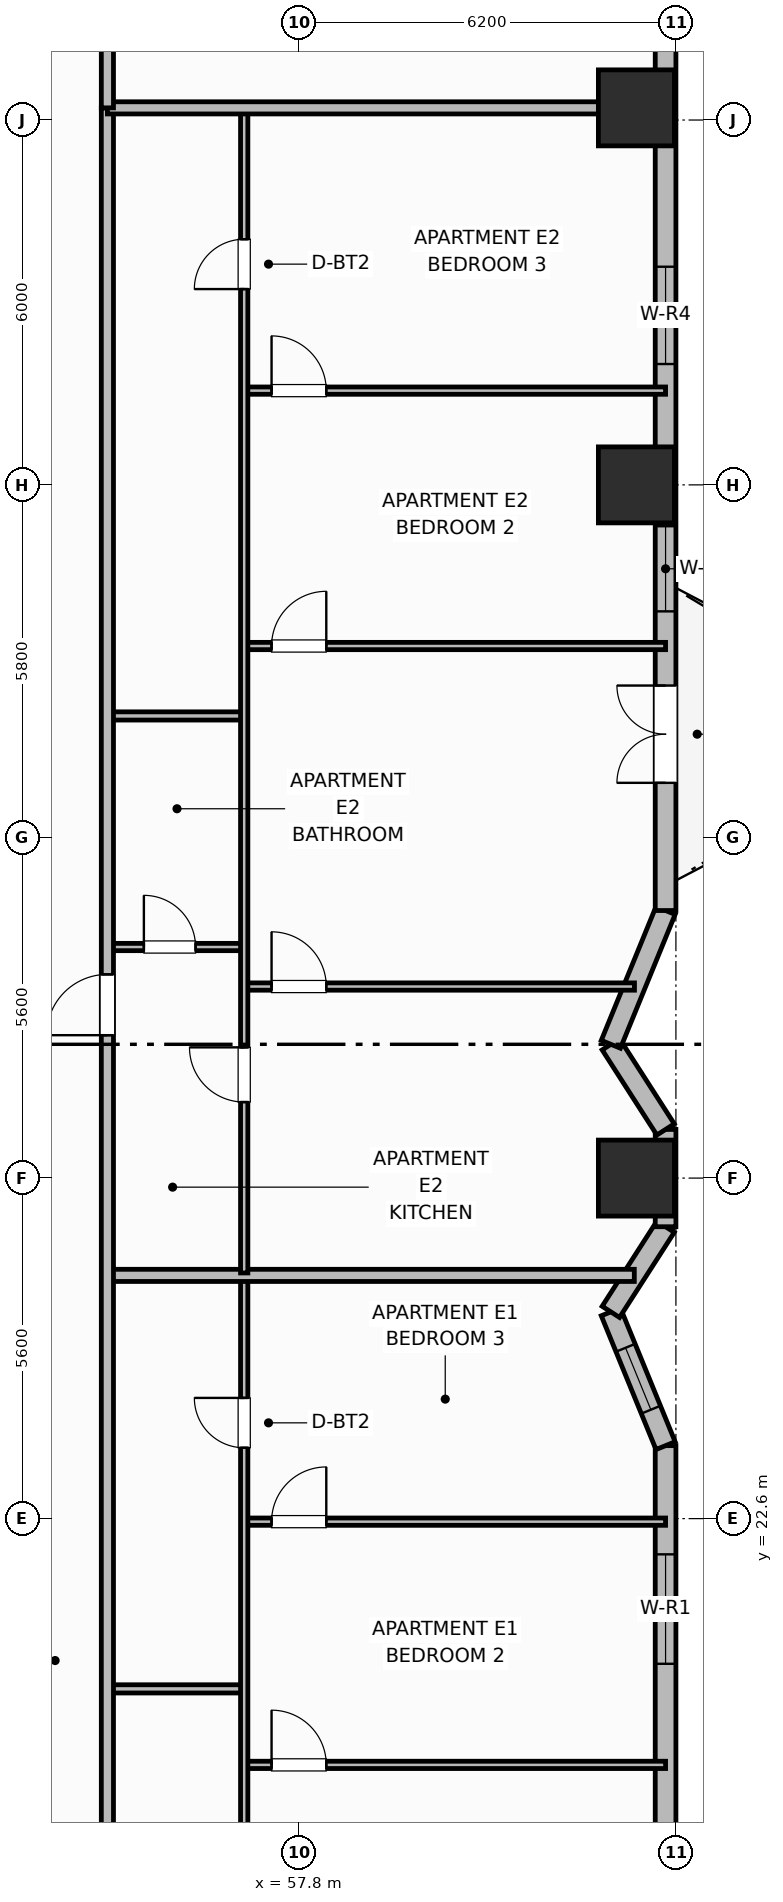
"""IFC4 building model, lengths in metres.
Left out: names, types, materials, properties, quantities, classifications, styles, units other than length and angle.
Written with IfcOpenShell. Run it as: python <this file> out.ifc"""

import sys

from ifc_helpers import new_model, si_unit, direction, frame, frame_2d, origin, origin_2d, place, context, subcontext, project, spatial, rectangle, extrude, element, fill, save


model = new_model("IFC4")
c1 = context("Model", 3, precision=1e-05, world=origin(), true_north=direction((0.0, 1.0)))
c2 = subcontext(c1, "Body", "Model", "MODEL_VIEW")
j1 = project(units=[si_unit("LENGTHUNIT", "METRE"), si_unit("PLANEANGLEUNIT", "RADIAN")], contexts=[c1])
p1 = place(None, origin())
s1 = spatial("IfcSite", under=j1, at=p1, CompositionType="ELEMENT")
p2 = place(p1, origin())
s2 = spatial("IfcBuilding", under=s1, at=p2, CompositionType="ELEMENT")
p3 = place(p2, frame((0.0, 0.0, 39.9)))
s3 = spatial("IfcBuildingStorey", under=s2, at=p3, CompositionType="ELEMENT", Elevation=39.9)
for number, where, z_axis, x_axis in (
    (1, (63.35, 28.2, 0.0), (0.0, 0.0, 1.0), (1.0, 0.0, 0.0)),
    (2, (63.35, 39.6, 0.0), (0.0, 0.0, 1.0), (1.0, 0.0, 0.0)),
    (3, (63.35, 45.8, 0.0), (0.0, 0.0, 1.0), (1.0, 0.0, 0.0)),
):
    element("IfcColumn", number, at=place(p3, frame(where, z_axis=z_axis, x_axis=x_axis)), inside=s3, PredefinedType="COLUMN", context=c2, shape_type="SweptSolid", body=[
        extrude(rectangle(XDim=1.25, YDim=1.25, at=origin_2d()), origin(), (0.0, 0.0, 1.0), 3.7),
    ])
p4 = place(p3, frame((63.83, 9.0, 0.0), z_axis=(0.0, 0.0, 1.0), x_axis=(0.0, 1.0, 0.0)))
e4 = element("IfcWall", 4, at=p4, inside=s3, PredefinedType="SOLIDWALL", context=c2, shape_type="SweptSolid", body=[
    extrude(rectangle(XDim=14.8, YDim=0.34, at=frame_2d((7.4, 0.0))), origin(), (0.0, 0.0, 1.0), 2.7),
])
p5 = place(p4, frame((6.0, 0.0, 0.89)))
e5 = element("IfcOpeningElement", 5, at=p5, cuts=e4, PredefinedType="OPENING", context=c2, shape_type="SweptSolid", body=[
    extrude(rectangle(XDim=1.1, YDim=1.65, at=frame_2d((0.55, 0.825))), frame((0.0, 0.18, 0.0), z_axis=(0.0, -1.0, 0.0), x_axis=(1.0, 0.0, 0.0)), (0.0, 0.0, 1.0), 0.36),
])
p6 = place(p4, frame((11.212, 0.0, 0.73)))
e6 = element("IfcOpeningElement", 6, at=p6, cuts=e4, PredefinedType="OPENING", context=c2, shape_type="SweptSolid", body=[
    extrude(rectangle(XDim=1.8, YDim=1.85, at=frame_2d((0.9, 0.925))), frame((0.0, 0.18, 0.0), z_axis=(0.0, -1.0, 0.0), x_axis=(1.0, 0.0, 0.0)), (0.0, 0.0, 1.0), 0.36),
])
p7 = place(p3, frame((63.83, 23.8, 0.0), z_axis=(0.0, 0.0, 1.0), x_axis=(-0.378692835005, 0.925522412865, 0.0)))
e7 = element("IfcWall", 7, at=p7, inside=s3, PredefinedType="SOLIDWALL", context=c2, shape_type="SweptSolid", body=[
    extrude(rectangle(XDim=2.377, YDim=0.34, at=frame_2d((1.188, 0.0))), origin(), (0.0, 0.0, 1.0), 2.7),
])
p8 = place(p7, frame((0.638, 0.0, 0.89)))
e8 = element("IfcOpeningElement", 8, at=p8, cuts=e7, PredefinedType="OPENING", context=c2, shape_type="SweptSolid", body=[
    extrude(rectangle(XDim=1.1, YDim=1.65, at=frame_2d((0.55, 0.825))), frame((0.0, 0.18, 0.0), z_axis=(0.0, -1.0, 0.0), x_axis=(1.0, 0.0, 0.0)), (0.0, 0.0, 1.0), 0.36),
])
p9 = place(p3, frame((62.93, 26.0, 0.0), z_axis=(0.0, 0.0, 1.0), x_axis=(0.540846555596, 0.841121277403, 0.0)))
e9 = element("IfcWall", 9, at=p9, inside=s3, PredefinedType="SOLIDWALL", context=c2, shape_type="SweptSolid", body=[
    extrude(rectangle(XDim=1.664, YDim=0.34, at=frame_2d((0.832, 0.0))), origin(), (0.0, 0.0, 1.0), 2.7),
])
p10 = place(p3, frame((63.83, 27.4, 0.0), z_axis=(0.0, 0.0, 1.0), x_axis=(0.0, 1.0, 0.0)))
e10 = element("IfcWall", 10, at=p10, inside=s3, PredefinedType="SOLIDWALL", context=c2, shape_type="SweptSolid", body=[
    extrude(rectangle(XDim=1.6, YDim=0.34, at=frame_2d((0.8, 0.0))), origin(), (0.0, 0.0, 1.0), 2.7),
])
p11 = place(p3, frame((63.83, 29.0, 0.0), z_axis=(0.0, 0.0, 1.0), x_axis=(-0.540846555596, 0.841121277403, 0.0)))
e11 = element("IfcWall", 11, at=p11, inside=s3, PredefinedType="SOLIDWALL", context=c2, shape_type="SweptSolid", body=[
    extrude(rectangle(XDim=1.664, YDim=0.34, at=frame_2d((0.832, 0.0))), origin(), (0.0, 0.0, 1.0), 2.7),
])
p12 = place(p3, frame((62.93, 30.4, 0.0), z_axis=(0.0, 0.0, 1.0), x_axis=(0.378656839344, 0.925537140269, 0.0)))
e12 = element("IfcWall", 12, at=p12, inside=s3, PredefinedType="SOLIDWALL", context=c2, shape_type="SweptSolid", body=[
    extrude(rectangle(XDim=2.377, YDim=0.34, at=frame_2d((1.188, 0.0))), origin(), (0.0, 0.0, 1.0), 2.7),
])
p13 = place(p3, frame((63.83, 32.6, 0.0), z_axis=(0.0, 0.0, 1.0), x_axis=(0.0, 1.0, 0.0)))
e13 = element("IfcWall", 13, at=p13, inside=s3, PredefinedType="SOLIDWALL", context=c2, shape_type="SweptSolid", body=[
    extrude(rectangle(XDim=14.8, YDim=0.34, at=frame_2d((7.4, 0.0))), origin(), (0.0, 0.0, 1.0), 2.7),
])
p14 = place(p13, frame((2.1, 0.0, 0.0)))
e14 = element("IfcOpeningElement", 14, at=p14, cuts=e13, PredefinedType="OPENING", context=c2, shape_type="SweptSolid", body=[
    extrude(rectangle(XDim=1.6, YDim=2.1, at=frame_2d((0.8, 1.05))), frame((0.0, 0.18, 0.0), z_axis=(0.0, -1.0, 0.0), x_axis=(1.0, 0.0, 0.0)), (0.0, 0.0, 1.0), 0.36),
])
p15 = place(p13, frame((4.92, 0.0, 0.69)))
e15 = element("IfcOpeningElement", 15, at=p15, cuts=e13, PredefinedType="OPENING", context=c2, shape_type="SweptSolid", body=[
    extrude(rectangle(XDim=1.4, YDim=1.85, at=frame_2d((0.7, 0.925))), frame((0.0, 0.18, 0.0), z_axis=(0.0, -1.0, 0.0), x_axis=(1.0, 0.0, 0.0)), (0.0, 0.0, 1.0), 0.36),
])
p16 = place(p13, frame((8.988, 0.0, 0.68)))
e16 = element("IfcOpeningElement", 16, at=p16, cuts=e13, PredefinedType="OPENING", context=c2, shape_type="SweptSolid", body=[
    extrude(rectangle(XDim=1.6, YDim=1.9, at=frame_2d((0.8, 0.95))), frame((0.0, 0.18, 0.0), z_axis=(0.0, -1.0, 0.0), x_axis=(1.0, 0.0, 0.0)), (0.0, 0.0, 1.0), 0.36),
])
p17 = place(p3, frame((54.65, 19.8, 0.0), z_axis=(0.0, 0.0, 1.0), x_axis=(1.0, 0.0, 0.0)))
e17 = element("IfcWall", 17, at=p17, inside=s3, PredefinedType="PARTITIONING", context=c2, shape_type="SweptSolid", body=[
    extrude(rectangle(XDim=2.25, YDim=0.135, at=frame_2d((1.125, 0.0))), origin(), (0.0, 0.0, 1.0), 2.53),
])
p18 = place(p3, frame((56.9, 18.55, 0.0), z_axis=(0.0, 0.0, 1.0), x_axis=(1.0, 0.0, 0.0)))
e18 = element("IfcWall", 18, at=p18, inside=s3, PredefinedType="PARTITIONING", context=c2, shape_type="SweptSolid", body=[
    extrude(rectangle(XDim=6.93, YDim=0.12, at=frame_2d((3.465, 0.0))), origin(), (0.0, 0.0, 1.0), 2.53),
])
p19 = place(p18, frame((0.45, 0.0, 0.0)))
e19 = element("IfcOpeningElement", 19, at=p19, cuts=e18, PredefinedType="OPENING", context=c2, shape_type="SweptSolid", body=[
    extrude(rectangle(XDim=0.9, YDim=2.1, at=frame_2d((0.45, 1.05))), frame((0.0, 0.07, 0.0), z_axis=(0.0, -1.0, 0.0), x_axis=(1.0, 0.0, 0.0)), (0.0, 0.0, 1.0), 0.14),
])
p20 = place(p3, frame((56.9, 22.55, 0.0), z_axis=(0.0, 0.0, 1.0), x_axis=(1.0, 0.0, 0.0)))
e20 = element("IfcWall", 20, at=p20, inside=s3, PredefinedType="PARTITIONING", context=c2, shape_type="SweptSolid", body=[
    extrude(rectangle(XDim=6.93, YDim=0.12, at=frame_2d((3.465, 0.0))), origin(), (0.0, 0.0, 1.0), 2.53),
])
p21 = place(p20, frame((0.45, 0.0, 0.0)))
e21 = element("IfcOpeningElement", 21, at=p21, cuts=e20, PredefinedType="OPENING", context=c2, shape_type="SweptSolid", body=[
    extrude(rectangle(XDim=0.9, YDim=2.1, at=frame_2d((0.45, 1.05))), frame((0.0, 0.07, 0.0), z_axis=(0.0, -1.0, 0.0), x_axis=(1.0, 0.0, 0.0)), (0.0, 0.0, 1.0), 0.14),
])
p22 = place(p3, frame((56.9, 10.64, 0.0), z_axis=(0.0, 0.0, 1.0), x_axis=(0.0, 1.0, 0.0)))
e22 = element("IfcWall", 22, at=p22, inside=s3, PredefinedType="PARTITIONING", context=c2, shape_type="SweptSolid", body=[
    extrude(rectangle(XDim=15.92, YDim=0.12, at=frame_2d((7.96, 0.0))), origin(), (0.0, 0.0, 1.0), 2.53),
])
p23 = place(p22, frame((0.41, 0.0, 0.0)))
e23 = element("IfcOpeningElement", 23, at=p23, cuts=e22, PredefinedType="OPENING", context=c2, shape_type="SweptSolid", body=[
    extrude(rectangle(XDim=0.9, YDim=2.1, at=frame_2d((0.45, 1.05))), frame((0.0, 0.07, 0.0), z_axis=(0.0, -1.0, 0.0), x_axis=(1.0, 0.0, 0.0)), (0.0, 0.0, 1.0), 0.14),
])
p24 = place(p22, frame((13.125, 0.0, 0.0)))
e24 = element("IfcOpeningElement", 24, at=p24, cuts=e22, PredefinedType="OPENING", context=c2, shape_type="SweptSolid", body=[
    extrude(rectangle(XDim=0.82, YDim=2.08, at=frame_2d((0.41, 1.04))), frame((0.0, 0.07, 0.0), z_axis=(0.0, -1.0, 0.0), x_axis=(1.0, 0.0, 0.0)), (0.0, 0.0, 1.0), 0.14),
])
p25 = place(p3, frame((54.65, 26.6, 0.0), z_axis=(0.0, 0.0, 1.0), x_axis=(1.0, 0.0, 0.0)))
e25 = element("IfcWall", 25, at=p25, inside=s3, PredefinedType="PARTITIONING", context=c2, shape_type="SweptSolid", body=[
    extrude(rectangle(XDim=8.666, YDim=0.2, at=frame_2d((4.333, 0.0))), origin(), (0.0, 0.0, 1.0), 2.53),
])
p26 = place(p3, frame((54.65, 32.0, 0.0), z_axis=(0.0, 0.0, 1.0), x_axis=(1.0, 0.0, 0.0)))
e26 = element("IfcWall", 26, at=p26, inside=s3, PredefinedType="PARTITIONING", context=c2, shape_type="SweptSolid", body=[
    extrude(rectangle(XDim=2.25, YDim=0.12, at=frame_2d((1.125, 0.0))), origin(), (0.0, 0.0, 1.0), 2.53),
])
p27 = place(p26, frame((0.6, 0.0, 0.0)))
e27 = element("IfcOpeningElement", 27, at=p27, cuts=e26, PredefinedType="OPENING", context=c2, shape_type="SweptSolid", body=[
    extrude(rectangle(XDim=0.85, YDim=2.1, at=frame_2d((0.425, 1.05))), frame((0.0, 0.07, 0.0), z_axis=(0.0, -1.0, 0.0), x_axis=(1.0, 0.0, 0.0)), (0.0, 0.0, 1.0), 0.14),
])
p28 = place(p3, frame((54.65, 35.8, 0.0), z_axis=(0.0, 0.0, 1.0), x_axis=(1.0, 0.0, 0.0)))
e28 = element("IfcWall", 28, at=p28, inside=s3, PredefinedType="PARTITIONING", context=c2, shape_type="SweptSolid", body=[
    extrude(rectangle(XDim=2.25, YDim=0.135, at=frame_2d((1.125, 0.0))), origin(), (0.0, 0.0, 1.0), 2.53),
])
p29 = place(p3, frame((56.9, 31.35, 0.0), z_axis=(0.0, 0.0, 1.0), x_axis=(1.0, 0.0, 0.0)))
e29 = element("IfcWall", 29, at=p29, inside=s3, PredefinedType="PARTITIONING", context=c2, shape_type="SweptSolid", body=[
    extrude(rectangle(XDim=6.419, YDim=0.12, at=frame_2d((3.209, 0.0))), origin(), (0.0, 0.0, 1.0), 2.53),
])
p30 = place(p29, frame((0.45, 0.0, 0.0)))
e30 = element("IfcOpeningElement", 30, at=p30, cuts=e29, PredefinedType="OPENING", context=c2, shape_type="SweptSolid", body=[
    extrude(rectangle(XDim=0.9, YDim=2.1, at=frame_2d((0.45, 1.05))), frame((0.0, 0.07, 0.0), z_axis=(0.0, -1.0, 0.0), x_axis=(1.0, 0.0, 0.0)), (0.0, 0.0, 1.0), 0.14),
])
p31 = place(p3, frame((56.9, 36.95, 0.0), z_axis=(0.0, 0.0, 1.0), x_axis=(1.0, 0.0, 0.0)))
e31 = element("IfcWall", 31, at=p31, inside=s3, PredefinedType="PARTITIONING", context=c2, shape_type="SweptSolid", body=[
    extrude(rectangle(XDim=6.93, YDim=0.12, at=frame_2d((3.465, 0.0))), origin(), (0.0, 0.0, 1.0), 2.53),
])
p32 = place(p31, frame((0.45, 0.0, 0.0)))
e32 = element("IfcOpeningElement", 32, at=p32, cuts=e31, PredefinedType="OPENING", context=c2, shape_type="SweptSolid", body=[
    extrude(rectangle(XDim=0.9, YDim=2.1, at=frame_2d((0.45, 1.05))), frame((0.0, 0.07, 0.0), z_axis=(0.0, -1.0, 0.0), x_axis=(1.0, 0.0, 0.0)), (0.0, 0.0, 1.0), 0.14),
])
p33 = place(p3, frame((56.9, 41.15, 0.0), z_axis=(0.0, 0.0, 1.0), x_axis=(1.0, 0.0, 0.0)))
e33 = element("IfcWall", 33, at=p33, inside=s3, PredefinedType="PARTITIONING", context=c2, shape_type="SweptSolid", body=[
    extrude(rectangle(XDim=6.93, YDim=0.12, at=frame_2d((3.465, 0.0))), origin(), (0.0, 0.0, 1.0), 2.53),
])
p34 = place(p33, frame((0.45, 0.0, 0.0)))
e34 = element("IfcOpeningElement", 34, at=p34, cuts=e33, PredefinedType="OPENING", context=c2, shape_type="SweptSolid", body=[
    extrude(rectangle(XDim=0.9, YDim=2.1, at=frame_2d((0.45, 1.05))), frame((0.0, 0.07, 0.0), z_axis=(0.0, -1.0, 0.0), x_axis=(1.0, 0.0, 0.0)), (0.0, 0.0, 1.0), 0.14),
])
p35 = place(p3, frame((56.9, 26.64, 0.0), z_axis=(0.0, 0.0, 1.0), x_axis=(0.0, 1.0, 0.0)))
e35 = element("IfcWall", 35, at=p35, inside=s3, PredefinedType="PARTITIONING", context=c2, shape_type="SweptSolid", body=[
    extrude(rectangle(XDim=19.12, YDim=0.12, at=frame_2d((9.56, 0.0))), origin(), (0.0, 0.0, 1.0), 2.53),
])
p36 = place(p35, frame((2.81, 0.0, 0.0)))
e36 = element("IfcOpeningElement", 36, at=p36, cuts=e35, PredefinedType="OPENING", context=c2, shape_type="SweptSolid", body=[
    extrude(rectangle(XDim=0.9, YDim=2.1, at=frame_2d((0.45, 1.05))), frame((0.0, 0.07, 0.0), z_axis=(0.0, -1.0, 0.0), x_axis=(1.0, 0.0, 0.0)), (0.0, 0.0, 1.0), 0.14),
])
p37 = place(p35, frame((16.18, 0.0, 0.0)))
e37 = element("IfcOpeningElement", 37, at=p37, cuts=e35, PredefinedType="OPENING", context=c2, shape_type="SweptSolid", body=[
    extrude(rectangle(XDim=0.82, YDim=2.08, at=frame_2d((0.41, 1.04))), frame((0.0, 0.07, 0.0), z_axis=(0.0, -1.0, 0.0), x_axis=(1.0, 0.0, 0.0)), (0.0, 0.0, 1.0), 0.14),
])
p38 = place(p3, frame((54.65, 10.6, 0.0), z_axis=(0.0, 0.0, 1.0), x_axis=(0.0, 1.0, 0.0)))
e38 = element("IfcWall", 38, at=p38, inside=s3, PredefinedType="PARTITIONING", context=c2, shape_type="SweptSolid", body=[
    extrude(rectangle(XDim=35.2, YDim=0.2, at=frame_2d((17.6, 0.0))), origin(), (0.0, 0.0, 1.0), 2.53),
])
p39 = place(p38, frame((2.65, 0.0, 0.0)))
e39 = element("IfcOpeningElement", 39, at=p39, cuts=e38, PredefinedType="OPENING", context=c2, shape_type="SweptSolid", body=[
    extrude(rectangle(XDim=1.0, YDim=2.15, at=frame_2d((0.5, 1.075))), frame((0.0, 0.11, 0.0), z_axis=(0.0, -1.0, 0.0), x_axis=(1.0, 0.0, 0.0)), (0.0, 0.0, 1.0), 0.22),
])
p40 = place(p38, frame((19.95, 0.0, 0.0)))
e40 = element("IfcOpeningElement", 40, at=p40, cuts=e38, PredefinedType="OPENING", context=c2, shape_type="SweptSolid", body=[
    extrude(rectangle(XDim=1.0, YDim=2.15, at=frame_2d((0.5, 1.075))), frame((0.0, 0.11, 0.0), z_axis=(0.0, -1.0, 0.0), x_axis=(1.0, 0.0, 0.0)), (0.0, 0.0, 1.0), 0.22),
])
p41 = place(p3, frame((54.65, 45.8, 0.0), z_axis=(0.0, 0.0, 1.0), x_axis=(1.0, 0.0, 0.0)))
e41 = element("IfcWall", 41, at=p41, inside=s3, PredefinedType="PARTITIONING", context=c2, shape_type="SweptSolid", body=[
    extrude(rectangle(XDim=8.76, YDim=0.2, at=frame_2d((4.38, 0.0))), origin(), (0.0, 0.0, 1.0), 2.53),
])
p42 = place(p3, frame((54.65, 45.8, 0.0), z_axis=(0.0, 0.0, 1.0), x_axis=(0.0, 1.0, 0.0)))
e42 = element("IfcWall", 42, at=p42, inside=s3, PredefinedType="PARTITIONING", context=c2, shape_type="SweptSolid", body=[
    extrude(rectangle(XDim=5.63, YDim=0.2, at=frame_2d((2.815, 0.0))), origin(), (0.0, 0.0, 1.0), 2.53),
])
p43 = place(p6, origin())
e43 = element("IfcWindow", 43, at=p43, inside=s3, PartitioningType="SINGLE_PANEL", PredefinedType="WINDOW", context=c2, shape_type="SweptSolid", body=[
    extrude(rectangle(XDim=1.8, YDim=1.85, at=frame_2d((0.9, 0.925))), frame((0.0, 0.03, 0.0), z_axis=(0.0, -1.0, 0.0), x_axis=(1.0, 0.0, 0.0)), (0.0, 0.0, 1.0), 0.06),
])
fill(e6, e43)
p44 = place(p8, origin())
e44 = element("IfcWindow", 44, at=p44, inside=s3, PartitioningType="SINGLE_PANEL", PredefinedType="WINDOW", context=c2, shape_type="SweptSolid", body=[
    extrude(rectangle(XDim=1.1, YDim=1.65, at=frame_2d((0.55, 0.825))), frame((0.0, 0.03, 0.0), z_axis=(0.0, -1.0, 0.0), x_axis=(1.0, 0.0, 0.0)), (0.0, 0.0, 1.0), 0.06),
])
fill(e8, e44)
p45 = place(p14, origin())
e45 = element("IfcDoor", 45, at=p45, inside=s3, OperationType="DOUBLE_DOOR_SINGLE_SWING", PredefinedType="DOOR", context=c2, shape_type="SweptSolid", body=[
    extrude(rectangle(XDim=1.6, YDim=2.1, at=frame_2d((0.8, 1.05))), frame((0.0, 0.025, 0.0), z_axis=(0.0, -1.0, 0.0), x_axis=(1.0, 0.0, 0.0)), (0.0, 0.0, 1.0), 0.05),
])
fill(e14, e45)
p46 = place(p15, origin())
e46 = element("IfcWindow", 46, at=p46, inside=s3, PartitioningType="SINGLE_PANEL", PredefinedType="WINDOW", context=c2, shape_type="SweptSolid", body=[
    extrude(rectangle(XDim=1.4, YDim=1.85, at=frame_2d((0.7, 0.925))), frame((0.0, 0.03, 0.0), z_axis=(0.0, -1.0, 0.0), x_axis=(1.0, 0.0, 0.0)), (0.0, 0.0, 1.0), 0.06),
])
fill(e15, e46)
p47 = place(p16, origin())
e47 = element("IfcWindow", 47, at=p47, inside=s3, PartitioningType="SINGLE_PANEL", PredefinedType="WINDOW", context=c2, shape_type="SweptSolid", body=[
    extrude(rectangle(XDim=1.6, YDim=1.9, at=frame_2d((0.8, 0.95))), frame((0.0, 0.03, 0.0), z_axis=(0.0, -1.0, 0.0), x_axis=(1.0, 0.0, 0.0)), (0.0, 0.0, 1.0), 0.06),
])
fill(e16, e47)
p48 = place(p19, origin())
e48 = element("IfcDoor", 48, at=p48, inside=s3, OperationType="SINGLE_SWING_LEFT", PredefinedType="DOOR", context=c2, shape_type="SweptSolid", body=[
    extrude(rectangle(XDim=0.9, YDim=2.1, at=frame_2d((0.45, 1.05))), frame((0.0, 0.025, 0.0), z_axis=(0.0, -1.0, 0.0), x_axis=(1.0, 0.0, 0.0)), (0.0, 0.0, 1.0), 0.05),
])
fill(e19, e48)
p49 = place(p21, origin())
e49 = element("IfcDoor", 49, at=p49, inside=s3, OperationType="SINGLE_SWING_RIGHT", PredefinedType="DOOR", context=c2, shape_type="SweptSolid", body=[
    extrude(rectangle(XDim=0.9, YDim=2.1, at=frame_2d((0.45, 1.05))), frame((0.0, 0.025, 0.0), z_axis=(0.0, -1.0, 0.0), x_axis=(1.0, 0.0, 0.0)), (0.0, 0.0, 1.0), 0.05),
])
fill(e21, e49)
p50 = place(p24, origin())
e50 = element("IfcDoor", 50, at=p50, inside=s3, OperationType="SINGLE_SWING_RIGHT", PredefinedType="DOOR", context=c2, shape_type="SweptSolid", body=[
    extrude(rectangle(XDim=0.82, YDim=2.08, at=frame_2d((0.41, 1.04))), frame((0.0, 0.025, 0.0), z_axis=(0.0, -1.0, 0.0), x_axis=(1.0, 0.0, 0.0)), (0.0, 0.0, 1.0), 0.05),
])
fill(e24, e50)
p51 = place(p27, origin())
e51 = element("IfcDoor", 51, at=p51, inside=s3, OperationType="SINGLE_SWING_LEFT", PredefinedType="DOOR", context=c2, shape_type="SweptSolid", body=[
    extrude(rectangle(XDim=0.85, YDim=2.1, at=frame_2d((0.425, 1.05))), frame((0.0, 0.025, 0.0), z_axis=(0.0, -1.0, 0.0), x_axis=(1.0, 0.0, 0.0)), (0.0, 0.0, 1.0), 0.05),
])
fill(e27, e51)
p52 = place(p30, origin())
e52 = element("IfcDoor", 52, at=p52, inside=s3, OperationType="SINGLE_SWING_LEFT", PredefinedType="DOOR", context=c2, shape_type="SweptSolid", body=[
    extrude(rectangle(XDim=0.9, YDim=2.1, at=frame_2d((0.45, 1.05))), frame((0.0, 0.025, 0.0), z_axis=(0.0, -1.0, 0.0), x_axis=(1.0, 0.0, 0.0)), (0.0, 0.0, 1.0), 0.05),
])
fill(e30, e52)
p53 = place(p32, origin())
e53 = element("IfcDoor", 53, at=p53, inside=s3, OperationType="SINGLE_SWING_RIGHT", PredefinedType="DOOR", context=c2, shape_type="SweptSolid", body=[
    extrude(rectangle(XDim=0.9, YDim=2.1, at=frame_2d((0.45, 1.05))), frame((0.0, 0.025, 0.0), z_axis=(0.0, -1.0, 0.0), x_axis=(1.0, 0.0, 0.0)), (0.0, 0.0, 1.0), 0.05),
])
fill(e32, e53)
p54 = place(p34, origin())
e54 = element("IfcDoor", 54, at=p54, inside=s3, OperationType="SINGLE_SWING_LEFT", PredefinedType="DOOR", context=c2, shape_type="SweptSolid", body=[
    extrude(rectangle(XDim=0.9, YDim=2.1, at=frame_2d((0.45, 1.05))), frame((0.0, 0.025, 0.0), z_axis=(0.0, -1.0, 0.0), x_axis=(1.0, 0.0, 0.0)), (0.0, 0.0, 1.0), 0.05),
])
fill(e34, e54)
p55 = place(p36, origin())
e55 = element("IfcDoor", 55, at=p55, inside=s3, OperationType="SINGLE_SWING_RIGHT", PredefinedType="DOOR", context=c2, shape_type="SweptSolid", body=[
    extrude(rectangle(XDim=0.9, YDim=2.1, at=frame_2d((0.45, 1.05))), frame((0.0, 0.025, 0.0), z_axis=(0.0, -1.0, 0.0), x_axis=(1.0, 0.0, 0.0)), (0.0, 0.0, 1.0), 0.05),
])
fill(e36, e55)
p56 = place(p37, origin())
e56 = element("IfcDoor", 56, at=p56, inside=s3, OperationType="SINGLE_SWING_LEFT", PredefinedType="DOOR", context=c2, shape_type="SweptSolid", body=[
    extrude(rectangle(XDim=0.82, YDim=2.08, at=frame_2d((0.41, 1.04))), frame((0.0, 0.025, 0.0), z_axis=(0.0, -1.0, 0.0), x_axis=(1.0, 0.0, 0.0)), (0.0, 0.0, 1.0), 0.05),
])
fill(e37, e56)
p57 = place(p40, origin())
e57 = element("IfcDoor", 57, at=p57, inside=s3, OperationType="SINGLE_SWING_LEFT", PredefinedType="DOOR", context=c2, shape_type="SweptSolid", body=[
    extrude(rectangle(XDim=1.0, YDim=2.15, at=frame_2d((0.5, 1.075))), frame((0.0, 0.025, 0.0), z_axis=(0.0, -1.0, 0.0), x_axis=(1.0, 0.0, 0.0)), (0.0, 0.0, 1.0), 0.05),
])
fill(e40, e57)
save(model, sys.argv[1])
